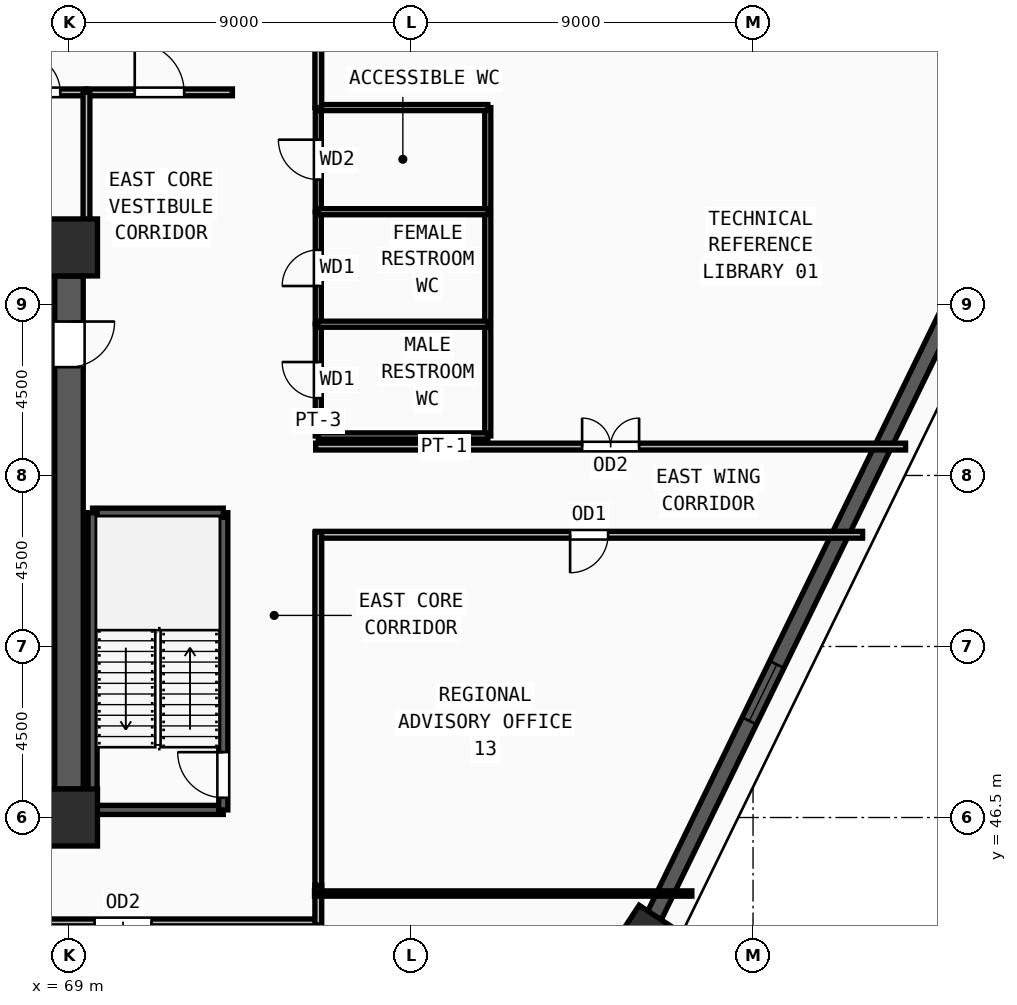
"""IFC4 building model, lengths in metres.
Left out: names, types, materials, properties, quantities, classifications, styles, units other than length and angle.
Written with IfcOpenShell. Run it as: python <this file> out.ifc"""

import sys

from ifc_helpers import new_model, si_unit, direction, frame, frame_2d, origin, origin_2d, place, context, subcontext, project, spatial, rectangle, extrude, source, transform, mapped, element, fill, save


model = new_model("IFC4")
c1 = context("Model", 3, precision=1e-05, world=origin(), true_north=direction((0.0, 1.0)))
c2 = subcontext(c1, "Body", "Model", "MODEL_VIEW")
j1 = project(units=[si_unit("LENGTHUNIT", "METRE"), si_unit("PLANEANGLEUNIT", "RADIAN")], contexts=[c1])
p1 = place(None, origin())
s1 = spatial("IfcSite", under=j1, at=p1, CompositionType="ELEMENT")
p2 = place(p1, origin())
s2 = spatial("IfcBuilding", under=s1, at=p2, CompositionType="ELEMENT")
p3 = place(p2, frame((0.0, 0.0, 124.5)))
s3 = spatial("IfcBuildingStorey", under=s2, at=p3, CompositionType="ELEMENT", Elevation=124.5)
m1 = source(origin(), c2, "Body", "SweptSolid", [
    extrude(rectangle(XDim=1.5, YDim=1.5, at=origin_2d()), origin(), (0.0, 0.0, 1.0), 3.75),
])
for number, where, z_axis, x_axis in (
    (1, (69.0, 46.5, 0.0), (0.0, 0.0, 1.0), (1.0, 0.0, 0.0)),
    (2, (69.0, 61.5, 0.0), (0.0, 0.0, 1.0), (1.0, 0.0, 0.0)),
):
    element("IfcColumn", number, at=place(p3, frame(where, z_axis=z_axis, x_axis=x_axis)), inside=s3, PredefinedType="COLUMN", context=c2, shape_type="MappedRepresentation", body=[
        mapped(m1, transform((0.0, 0.0, 0.0), x_axis=(1.0, 0.0, 0.0), y_axis=(0.0, 1.0, 0.0), z_axis=(0.0, 0.0, 1.0), scale=1.0)),
    ])
m2 = source(origin(), c2, "Body", "SweptSolid", [
    extrude(rectangle(XDim=1.4, YDim=1.15, at=origin_2d()), origin(), (0.0, 0.0, 1.0), 3.75),
])
p4 = place(p3, frame((84.099, 43.29, 0.0), z_axis=(0.0, 0.0, 1.0), x_axis=(0.549751988372, 0.835327930385, 0.0)))
e3 = element("IfcColumn", 3, at=p4, inside=s3, PredefinedType="COLUMN", context=c2, shape_type="MappedRepresentation", body=[
    mapped(m2, transform((0.0, 0.0, 0.0), x_axis=(1.0, 0.0, 0.0), y_axis=(0.0, 1.0, 0.0), z_axis=(0.0, 0.0, 1.0), scale=1.0)),
])
p5 = place(p3, frame((84.401, 43.91, 0.0), z_axis=(0.0, 0.0, 1.0), x_axis=(0.438149799109, 0.898901971041, 0.0)))
e4 = element("IfcWall", 4, at=p5, inside=s3, PredefinedType="SOLIDWALL", context=c2, shape_type="SweptSolid", body=[
    extrude(rectangle(XDim=26.14, YDim=0.42, at=frame_2d((13.07, 0.0))), origin(), (0.0, 0.0, 1.0), 3.57),
])
m3 = source(origin(), c2, "Body", "SweptSolid", [
    extrude(rectangle(XDim=1.65, YDim=1.95, at=frame_2d((0.825, 0.975))), frame((0.0, 0.22, 0.0), z_axis=(0.0, -1.0, 0.0), x_axis=(1.0, 0.0, 0.0)), (0.0, 0.0, 1.0), 0.44),
])
p6 = place(p5, frame((5.71, 0.0, 0.55)))
e5 = element("IfcOpeningElement", 5, at=p6, cuts=e4, PredefinedType="OPENING", context=c2, shape_type="MappedRepresentation", body=[
    mapped(m3, transform((0.0, 0.0, 0.0), x_axis=(1.0, 0.0, 0.0), y_axis=(0.0, 1.0, 0.0), z_axis=(0.0, 0.0, 1.0), scale=1.0)),
])
p7 = place(p5, frame((18.78, 0.0, 0.55)))
e6 = element("IfcOpeningElement", 6, at=p7, cuts=e4, PredefinedType="OPENING", context=c2, shape_type="MappedRepresentation", body=[
    mapped(m3, transform((0.0, 0.0, 0.0), x_axis=(1.0, 0.0, 0.0), y_axis=(0.0, 1.0, 0.0), z_axis=(0.0, 0.0, 1.0), scale=1.0)),
])
p8 = place(p3, frame((69.0, 60.75, 0.0), z_axis=(0.0, 0.0, 1.0), x_axis=(0.0, -1.0, 0.0)))
e7 = element("IfcWall", 7, at=p8, inside=s3, PredefinedType="SHEAR", context=c2, shape_type="SweptSolid", body=[
    extrude(rectangle(XDim=13.5, YDim=0.75, at=frame_2d((6.75, 0.0))), origin(), (0.0, 0.0, 1.0), 3.57),
])
m4 = source(origin(), c2, "Body", "SweptSolid", [
    extrude(rectangle(XDim=1.2, YDim=2.2, at=frame_2d((0.6, 1.1))), frame((0.0, 0.385, 0.0), z_axis=(0.0, -1.0, 0.0), x_axis=(1.0, 0.0, 0.0)), (0.0, 0.0, 1.0), 0.77),
])
p9 = place(p8, frame((1.2, 0.0, 0.0)))
e8 = element("IfcOpeningElement", 8, at=p9, cuts=e7, PredefinedType="OPENING", context=c2, shape_type="MappedRepresentation", body=[
    mapped(m4, transform((0.0, 0.0, 0.0), x_axis=(1.0, 0.0, 0.0), y_axis=(0.0, 1.0, 0.0), z_axis=(0.0, 0.0, 1.0), scale=1.0)),
])
p10 = place(p3, frame((69.62, 46.7, 0.0), z_axis=(0.0, 0.0, 1.0), x_axis=(1.0, 0.0, 0.0)))
e9 = element("IfcWall", 9, at=p10, inside=s3, PredefinedType="SOLIDWALL", context=c2, shape_type="SweptSolid", body=[
    extrude(rectangle(XDim=3.44, YDim=0.24, at=frame_2d((1.72, 0.0))), origin(), (0.0, 0.0, 1.0), 3.57),
])
p11 = place(p3, frame((73.06, 46.7, 0.0), z_axis=(0.0, 0.0, 1.0), x_axis=(0.0, 1.0, 0.0)))
e10 = element("IfcWall", 10, at=p11, inside=s3, PredefinedType="SOLIDWALL", context=c2, shape_type="SweptSolid", body=[
    extrude(rectangle(XDim=7.82, YDim=0.24, at=frame_2d((3.91, 0.0))), origin(), (0.0, 0.0, 1.0), 3.57),
])
m5 = source(origin(), c2, "Body", "SweptSolid", [
    extrude(rectangle(XDim=1.2, YDim=2.2, at=frame_2d((0.6, 1.1))), frame((0.0, 0.13, 0.0), z_axis=(0.0, -1.0, 0.0), x_axis=(1.0, 0.0, 0.0)), (0.0, 0.0, 1.0), 0.26),
])
p12 = place(p11, frame((0.32, 0.0, 0.0)))
e11 = element("IfcOpeningElement", 11, at=p12, cuts=e10, PredefinedType="OPENING", context=c2, shape_type="MappedRepresentation", body=[
    mapped(m5, transform((0.0, 0.0, 0.0), x_axis=(1.0, 0.0, 0.0), y_axis=(0.0, 1.0, 0.0), z_axis=(0.0, 0.0, 1.0), scale=1.0)),
])
p13 = place(p3, frame((73.06, 54.52, 0.0), z_axis=(0.0, 0.0, 1.0), x_axis=(-1.0, 0.0, 0.0)))
e12 = element("IfcWall", 12, at=p13, inside=s3, PredefinedType="SOLIDWALL", context=c2, shape_type="SweptSolid", body=[
    extrude(rectangle(XDim=3.44, YDim=0.24, at=frame_2d((1.72, 0.0))), origin(), (0.0, 0.0, 1.0), 3.57),
])
p14 = place(p3, frame((69.62, 54.52, 0.0), z_axis=(0.0, 0.0, 1.0), x_axis=(0.0, -1.0, 0.0)))
e13 = element("IfcWall", 13, at=p14, inside=s3, PredefinedType="SOLIDWALL", context=c2, shape_type="SweptSolid", body=[
    extrude(rectangle(XDim=7.82, YDim=0.24, at=frame_2d((3.91, 0.0))), origin(), (0.0, 0.0, 1.0), 3.57),
])
p15 = place(p3, frame((75.56, 56.54, 0.0), z_axis=(0.0, 0.0, 1.0), x_axis=(0.0, 1.0, 0.0)))
e14 = element("IfcWall", 14, at=p15, inside=s3, PredefinedType="PARTITIONING", context=c2, shape_type="SweptSolid", body=[
    extrude(rectangle(XDim=2.94, YDim=0.16, at=frame_2d((1.47, 0.0))), origin(), (0.0, 0.0, 1.0), 3.57),
])
m6 = source(origin(), c2, "Body", "SweptSolid", [
    extrude(rectangle(XDim=0.95, YDim=2.15, at=frame_2d((0.475, 1.075))), frame((0.0, 0.09, 0.0), z_axis=(0.0, -1.0, 0.0), x_axis=(1.0, 0.0, 0.0)), (0.0, 0.0, 1.0), 0.18),
])
p16 = place(p15, frame((0.995, 0.0, 0.0)))
e15 = element("IfcOpeningElement", 15, at=p16, cuts=e14, PredefinedType="OPENING", context=c2, shape_type="MappedRepresentation", body=[
    mapped(m6, transform((0.0, 0.0, 0.0), x_axis=(1.0, 0.0, 0.0), y_axis=(0.0, 1.0, 0.0), z_axis=(0.0, 0.0, 1.0), scale=1.0)),
])
p17 = place(p3, frame((75.56, 59.48, 0.0), z_axis=(0.0, 0.0, 1.0), x_axis=(0.0, 1.0, 0.0)))
e16 = element("IfcWall", 16, at=p17, inside=s3, PredefinedType="PARTITIONING", context=c2, shape_type="SweptSolid", body=[
    extrude(rectangle(XDim=2.96, YDim=0.16, at=frame_2d((1.48, 0.0))), origin(), (0.0, 0.0, 1.0), 3.57),
])
p18 = place(p17, frame((1.005, 0.0, 0.0)))
e17 = element("IfcOpeningElement", 17, at=p18, cuts=e16, PredefinedType="OPENING", context=c2, shape_type="MappedRepresentation", body=[
    mapped(m6, transform((0.0, 0.0, 0.0), x_axis=(1.0, 0.0, 0.0), y_axis=(0.0, 1.0, 0.0), z_axis=(0.0, 0.0, 1.0), scale=1.0)),
])
p19 = place(p3, frame((75.56, 62.44, 0.0), z_axis=(0.0, 0.0, 1.0), x_axis=(0.0, 1.0, 0.0)))
e18 = element("IfcWall", 18, at=p19, inside=s3, PredefinedType="PARTITIONING", context=c2, shape_type="SweptSolid", body=[
    extrude(rectangle(XDim=2.74, YDim=0.16, at=frame_2d((1.37, 0.0))), origin(), (0.0, 0.0, 1.0), 3.57),
])
m7 = source(origin(), c2, "Body", "SweptSolid", [
    extrude(rectangle(XDim=1.05, YDim=2.15, at=frame_2d((0.525, 1.075))), frame((0.0, 0.09, 0.0), z_axis=(0.0, -1.0, 0.0), x_axis=(1.0, 0.0, 0.0)), (0.0, 0.0, 1.0), 0.18),
])
p20 = place(p19, frame((0.845, 0.0, 0.0)))
e19 = element("IfcOpeningElement", 19, at=p20, cuts=e18, PredefinedType="OPENING", context=c2, shape_type="MappedRepresentation", body=[
    mapped(m7, transform((0.0, 0.0, 0.0), x_axis=(1.0, 0.0, 0.0), y_axis=(0.0, 1.0, 0.0), z_axis=(0.0, 0.0, 1.0), scale=1.0)),
])
p21 = place(p3, frame((67.08, 65.58, 0.0), z_axis=(0.0, 0.0, 1.0), x_axis=(1.0, 0.0, 0.0)))
e20 = element("IfcWall", 20, at=p21, inside=s3, PredefinedType="PARTITIONING", context=c2, shape_type="SweptSolid", body=[
    extrude(rectangle(XDim=2.38, YDim=0.18, at=frame_2d((1.19, 0.0))), origin(), (0.0, 0.0, 1.0), 3.57),
])
m8 = source(origin(), c2, "Body", "SweptSolid", [
    extrude(rectangle(XDim=1.0, YDim=2.2, at=frame_2d((0.5, 1.1))), frame((0.0, 0.1, 0.0), z_axis=(0.0, -1.0, 0.0), x_axis=(1.0, 0.0, 0.0)), (0.0, 0.0, 1.0), 0.2),
])
p22 = place(p21, frame((0.69, 0.0, 0.0)))
e21 = element("IfcOpeningElement", 21, at=p22, cuts=e20, PredefinedType="OPENING", context=c2, shape_type="MappedRepresentation", body=[
    mapped(m8, transform((0.0, 0.0, 0.0), x_axis=(1.0, 0.0, 0.0), y_axis=(0.0, 1.0, 0.0), z_axis=(0.0, 0.0, 1.0), scale=1.0)),
])
p23 = place(p3, frame((69.46, 65.58, 0.0), z_axis=(0.0, 0.0, 1.0), x_axis=(1.0, 0.0, 0.0)))
e22 = element("IfcWall", 22, at=p23, inside=s3, PredefinedType="PARTITIONING", context=c2, shape_type="SweptSolid", body=[
    extrude(rectangle(XDim=3.84, YDim=0.18, at=frame_2d((1.92, 0.0))), origin(), (0.0, 0.0, 1.0), 3.57),
])
m9 = source(origin(), c2, "Body", "SweptSolid", [
    extrude(rectangle(XDim=1.3, YDim=2.2, at=frame_2d((0.65, 1.1))), frame((0.0, 0.1, 0.0), z_axis=(0.0, -1.0, 0.0), x_axis=(1.0, 0.0, 0.0)), (0.0, 0.0, 1.0), 0.2),
])
p24 = place(p23, frame((1.27, 0.0, 0.0)))
e23 = element("IfcOpeningElement", 23, at=p24, cuts=e22, PredefinedType="OPENING", context=c2, shape_type="MappedRepresentation", body=[
    mapped(m9, transform((0.0, 0.0, 0.0), x_axis=(1.0, 0.0, 0.0), y_axis=(0.0, 1.0, 0.0), z_axis=(0.0, 0.0, 1.0), scale=1.0)),
])
p25 = place(p3, frame((75.49, 56.26, 0.0), z_axis=(0.0, 0.0, 1.0), x_axis=(1.0, 0.0, 0.0)))
e24 = element("IfcWall", 24, at=p25, inside=s3, PredefinedType="PARTITIONING", context=c2, shape_type="SweptSolid", body=[
    extrude(rectangle(XDim=15.524, YDim=0.18, at=frame_2d((7.762, 0.0))), origin(), (0.0, 0.0, 1.0), 3.57),
])
m10 = source(origin(), c2, "Body", "SweptSolid", [
    extrude(rectangle(XDim=1.5, YDim=2.2, at=frame_2d((0.75, 1.1))), frame((0.0, 0.1, 0.0), z_axis=(0.0, -1.0, 0.0), x_axis=(1.0, 0.0, 0.0)), (0.0, 0.0, 1.0), 0.2),
])
p26 = place(p25, frame((7.012, 0.0, 0.0)))
e25 = element("IfcOpeningElement", 25, at=p26, cuts=e24, PredefinedType="OPENING", context=c2, shape_type="MappedRepresentation", body=[
    mapped(m10, transform((0.0, 0.0, 0.0), x_axis=(1.0, 0.0, 0.0), y_axis=(0.0, 1.0, 0.0), z_axis=(0.0, 0.0, 1.0), scale=1.0)),
])
p27 = place(p3, frame((75.63, 43.74, 0.0), z_axis=(0.0, 0.0, 1.0), x_axis=(-1.0, 0.0, 0.0)))
e26 = element("IfcWall", 26, at=p27, inside=s3, PredefinedType="PARTITIONING", context=c2, shape_type="SweptSolid", body=[
    extrude(rectangle(XDim=10.415, YDim=0.18, at=frame_2d((5.208, 0.0))), origin(), (0.0, 0.0, 1.0), 3.57),
])
p28 = place(p27, frame((4.457, 0.0, 0.0)))
e27 = element("IfcOpeningElement", 27, at=p28, cuts=e26, PredefinedType="OPENING", context=c2, shape_type="MappedRepresentation", body=[
    mapped(m10, transform((0.0, 0.0, 0.0), x_axis=(1.0, 0.0, 0.0), y_axis=(0.0, 1.0, 0.0), z_axis=(0.0, 0.0, 1.0), scale=1.0)),
])
p29 = place(p3, frame((89.883, 53.94, 0.0), z_axis=(0.0, 0.0, 1.0), x_axis=(-1.0, 0.0, 0.0)))
e28 = element("IfcWall", 28, at=p29, inside=s3, PredefinedType="PARTITIONING", context=c2, shape_type="SweptSolid", body=[
    extrude(rectangle(XDim=14.393, YDim=0.18, at=frame_2d((7.197, 0.0))), origin(), (0.0, 0.0, 1.0), 3.57),
])
p30 = place(p29, frame((6.697, 0.0, 0.0)))
e29 = element("IfcOpeningElement", 29, at=p30, cuts=e28, PredefinedType="OPENING", context=c2, shape_type="MappedRepresentation", body=[
    mapped(m8, transform((0.0, 0.0, 0.0), x_axis=(1.0, 0.0, 0.0), y_axis=(0.0, 1.0, 0.0), z_axis=(0.0, 0.0, 1.0), scale=1.0)),
])
p31 = place(p3, frame((80.02, 56.54, 0.0), z_axis=(0.0, 0.0, 1.0), x_axis=(0.0, 1.0, 0.0)))
e30 = element("IfcWall", 30, at=p31, inside=s3, PredefinedType="PARTITIONING", context=c2, shape_type="SweptSolid", body=[
    extrude(rectangle(XDim=8.64, YDim=0.16, at=frame_2d((4.32, 0.0))), origin(), (0.0, 0.0, 1.0), 3.155),
])
for number, where, z_axis, x_axis in (
    (31, (75.56, 56.54, 0.0), (0.0, 0.0, 1.0), (1.0, 0.0, 0.0)),
    (32, (75.56, 59.48, 0.0), (0.0, 0.0, 1.0), (1.0, 0.0, 0.0)),
    (33, (75.56, 62.44, 0.0), (0.0, 0.0, 1.0), (1.0, 0.0, 0.0)),
    (34, (75.56, 65.18, 0.0), (0.0, 0.0, 1.0), (1.0, 0.0, 0.0)),
):
    element("IfcWall", number, at=place(p3, frame(where, z_axis=z_axis, x_axis=x_axis)), inside=s3, PredefinedType="PARTITIONING", context=c2, shape_type="SweptSolid", body=[
        extrude(rectangle(XDim=4.46, YDim=0.16, at=frame_2d((2.23, 0.0))), origin(), (0.0, 0.0, 1.0), 3.57),
    ])
p32 = place(p3, frame((69.46, 61.95, 0.0), z_axis=(0.0, 0.0, 1.0), x_axis=(0.0, 1.0, 0.0)))
e35 = element("IfcWall", 35, at=p32, inside=s3, PredefinedType="PARTITIONING", context=c2, shape_type="SweptSolid", body=[
    extrude(rectangle(XDim=3.63, YDim=0.18, at=frame_2d((1.815, 0.0))), origin(), (0.0, 0.0, 1.0), 3.57),
])
p33 = place(p3, frame((75.56, 67.215, 0.0), z_axis=(0.0, 0.0, 1.0), x_axis=(0.0, -1.0, 0.0)))
e36 = element("IfcWall", 36, at=p33, inside=s3, PredefinedType="PARTITIONING", context=c2, shape_type="SweptSolid", body=[
    extrude(rectangle(XDim=2.035, YDim=0.18, at=frame_2d((1.018, 0.0))), origin(), (0.0, 0.0, 1.0), 3.57),
])
p34 = place(p3, frame((75.56, 44.715, 0.0), z_axis=(0.0, 0.0, 1.0), x_axis=(0.0, -1.0, 0.0)))
e37 = element("IfcWall", 37, at=p34, inside=s3, PredefinedType="PARTITIONING", context=c2, shape_type="SweptSolid", body=[
    extrude(rectangle(XDim=1.045, YDim=0.18, at=frame_2d((0.522, 0.0))), origin(), (0.0, 0.0, 1.0), 3.57),
])
p35 = place(p3, frame((75.56, 54.01, 0.0), z_axis=(0.0, 0.0, 1.0), x_axis=(0.0, -1.0, 0.0)))
e38 = element("IfcWall", 38, at=p35, inside=s3, PredefinedType="PARTITIONING", context=c2, shape_type="SweptSolid", body=[
    extrude(rectangle(XDim=9.295, YDim=0.18, at=frame_2d((4.647, 0.0))), origin(), (0.0, 0.0, 1.0), 3.155),
])
p36 = place(p3, frame((75.46, 44.5, 0.0), z_axis=(0.0, 0.0, 1.0), x_axis=(1.0, 0.0, 0.0)))
e39 = element("IfcWall", 39, at=p36, inside=s3, PredefinedType="PARTITIONING", context=c2, shape_type="SweptSolid", body=[
    extrude(rectangle(XDim=9.93, YDim=0.14, at=frame_2d((4.965, 0.0))), origin(), (0.0, 0.0, 1.0), 3.57),
])
m11 = source(origin(), c2, "Body", "SweptSolid", [
    extrude(rectangle(XDim=1.65, YDim=1.95, at=frame_2d((0.825, 0.975))), frame((0.0, 0.03, 0.0), z_axis=(0.0, -1.0, 0.0), x_axis=(1.0, 0.0, 0.0)), (0.0, 0.0, 1.0), 0.06),
])
p37 = place(p6, origin())
e40 = element("IfcWindow", 40, at=p37, inside=s3, PartitioningType="DOUBLE_PANEL_VERTICAL", PredefinedType="WINDOW", context=c2, shape_type="MappedRepresentation", body=[
    mapped(m11, transform((0.0, 0.0, 0.0), x_axis=(1.0, 0.0, 0.0), y_axis=(0.0, 1.0, 0.0), z_axis=(0.0, 0.0, 1.0), scale=1.0)),
])
fill(e5, e40)
m12 = source(origin(), c2, "Body", "SweptSolid", [
    extrude(rectangle(XDim=1.2, YDim=2.2, at=frame_2d((0.6, 1.1))), frame((0.0, 0.025, 0.0), z_axis=(0.0, -1.0, 0.0), x_axis=(1.0, 0.0, 0.0)), (0.0, 0.0, 1.0), 0.05),
])
p38 = place(p9, origin())
e41 = element("IfcDoor", 41, at=p38, inside=s3, OperationType="SINGLE_SWING_LEFT", PredefinedType="DOOR", context=c2, shape_type="MappedRepresentation", body=[
    mapped(m12, transform((0.0, 0.0, 0.0), x_axis=(1.0, 0.0, 0.0), y_axis=(0.0, 1.0, 0.0), z_axis=(0.0, 0.0, 1.0), scale=1.0)),
])
fill(e8, e41)
p39 = place(p12, origin())
e42 = element("IfcDoor", 42, at=p39, inside=s3, OperationType="SINGLE_SWING_RIGHT", PredefinedType="DOOR", context=c2, shape_type="MappedRepresentation", body=[
    mapped(m12, transform((0.0, 0.0, 0.0), x_axis=(1.0, 0.0, 0.0), y_axis=(0.0, 1.0, 0.0), z_axis=(0.0, 0.0, 1.0), scale=1.0)),
])
fill(e11, e42)
m13 = source(origin(), c2, "Body", "SweptSolid", [
    extrude(rectangle(XDim=0.95, YDim=2.15, at=frame_2d((0.475, 1.075))), frame((0.0, 0.025, 0.0), z_axis=(0.0, -1.0, 0.0), x_axis=(1.0, 0.0, 0.0)), (0.0, 0.0, 1.0), 0.05),
])
p40 = place(p16, origin())
e43 = element("IfcDoor", 43, at=p40, inside=s3, OperationType="SINGLE_SWING_RIGHT", PredefinedType="DOOR", context=c2, shape_type="MappedRepresentation", body=[
    mapped(m13, transform((0.0, 0.0, 0.0), x_axis=(1.0, 0.0, 0.0), y_axis=(0.0, 1.0, 0.0), z_axis=(0.0, 0.0, 1.0), scale=1.0)),
])
fill(e15, e43)
p41 = place(p18, origin())
e44 = element("IfcDoor", 44, at=p41, inside=s3, OperationType="SINGLE_SWING_LEFT", PredefinedType="DOOR", context=c2, shape_type="MappedRepresentation", body=[
    mapped(m13, transform((0.0, 0.0, 0.0), x_axis=(1.0, 0.0, 0.0), y_axis=(0.0, 1.0, 0.0), z_axis=(0.0, 0.0, 1.0), scale=1.0)),
])
fill(e17, e44)
m14 = source(origin(), c2, "Body", "SweptSolid", [
    extrude(rectangle(XDim=1.05, YDim=2.15, at=frame_2d((0.525, 1.075))), frame((0.0, 0.025, 0.0), z_axis=(0.0, -1.0, 0.0), x_axis=(1.0, 0.0, 0.0)), (0.0, 0.0, 1.0), 0.05),
])
p42 = place(p20, origin())
e45 = element("IfcDoor", 45, at=p42, inside=s3, OperationType="SINGLE_SWING_RIGHT", PredefinedType="DOOR", context=c2, shape_type="MappedRepresentation", body=[
    mapped(m14, transform((0.0, 0.0, 0.0), x_axis=(1.0, 0.0, 0.0), y_axis=(0.0, 1.0, 0.0), z_axis=(0.0, 0.0, 1.0), scale=1.0)),
])
fill(e19, e45)
m15 = source(origin(), c2, "Body", "SweptSolid", [
    extrude(rectangle(XDim=1.0, YDim=2.2, at=frame_2d((0.5, 1.1))), frame((0.0, 0.025, 0.0), z_axis=(0.0, -1.0, 0.0), x_axis=(1.0, 0.0, 0.0)), (0.0, 0.0, 1.0), 0.05),
])
p43 = place(p22, origin())
e46 = element("IfcDoor", 46, at=p43, inside=s3, OperationType="SINGLE_SWING_LEFT", PredefinedType="DOOR", context=c2, shape_type="MappedRepresentation", body=[
    mapped(m15, transform((0.0, 0.0, 0.0), x_axis=(1.0, 0.0, 0.0), y_axis=(0.0, 1.0, 0.0), z_axis=(0.0, 0.0, 1.0), scale=1.0)),
])
fill(e21, e46)
m16 = source(origin(), c2, "Body", "SweptSolid", [
    extrude(rectangle(XDim=1.3, YDim=2.2, at=frame_2d((0.65, 1.1))), frame((0.0, 0.025, 0.0), z_axis=(0.0, -1.0, 0.0), x_axis=(1.0, 0.0, 0.0)), (0.0, 0.0, 1.0), 0.05),
])
p44 = place(p24, origin())
e47 = element("IfcDoor", 47, at=p44, inside=s3, OperationType="SINGLE_SWING_LEFT", PredefinedType="DOOR", context=c2, shape_type="MappedRepresentation", body=[
    mapped(m16, transform((0.0, 0.0, 0.0), x_axis=(1.0, 0.0, 0.0), y_axis=(0.0, 1.0, 0.0), z_axis=(0.0, 0.0, 1.0), scale=1.0)),
])
fill(e23, e47)
m17 = source(origin(), c2, "Body", "SweptSolid", [
    extrude(rectangle(XDim=1.5, YDim=2.2, at=frame_2d((0.75, 1.1))), frame((0.0, 0.025, 0.0), z_axis=(0.0, -1.0, 0.0), x_axis=(1.0, 0.0, 0.0)), (0.0, 0.0, 1.0), 0.05),
])
p45 = place(p26, origin())
e48 = element("IfcDoor", 48, at=p45, inside=s3, OperationType="DOUBLE_DOOR_SINGLE_SWING", PredefinedType="DOOR", context=c2, shape_type="MappedRepresentation", body=[
    mapped(m17, transform((0.0, 0.0, 0.0), x_axis=(1.0, 0.0, 0.0), y_axis=(0.0, 1.0, 0.0), z_axis=(0.0, 0.0, 1.0), scale=1.0)),
])
fill(e25, e48)
p46 = place(p28, origin())
e49 = element("IfcDoor", 49, at=p46, inside=s3, OperationType="DOUBLE_DOOR_SINGLE_SWING", PredefinedType="DOOR", context=c2, shape_type="MappedRepresentation", body=[
    mapped(m17, transform((0.0, 0.0, 0.0), x_axis=(1.0, 0.0, 0.0), y_axis=(0.0, 1.0, 0.0), z_axis=(0.0, 0.0, 1.0), scale=1.0)),
])
fill(e27, e49)
p47 = place(p30, origin())
e50 = element("IfcDoor", 50, at=p47, inside=s3, OperationType="SINGLE_SWING_RIGHT", PredefinedType="DOOR", context=c2, shape_type="MappedRepresentation", body=[
    mapped(m15, transform((0.0, 0.0, 0.0), x_axis=(1.0, 0.0, 0.0), y_axis=(0.0, 1.0, 0.0), z_axis=(0.0, 0.0, 1.0), scale=1.0)),
])
fill(e29, e50)
save(model, sys.argv[1])
